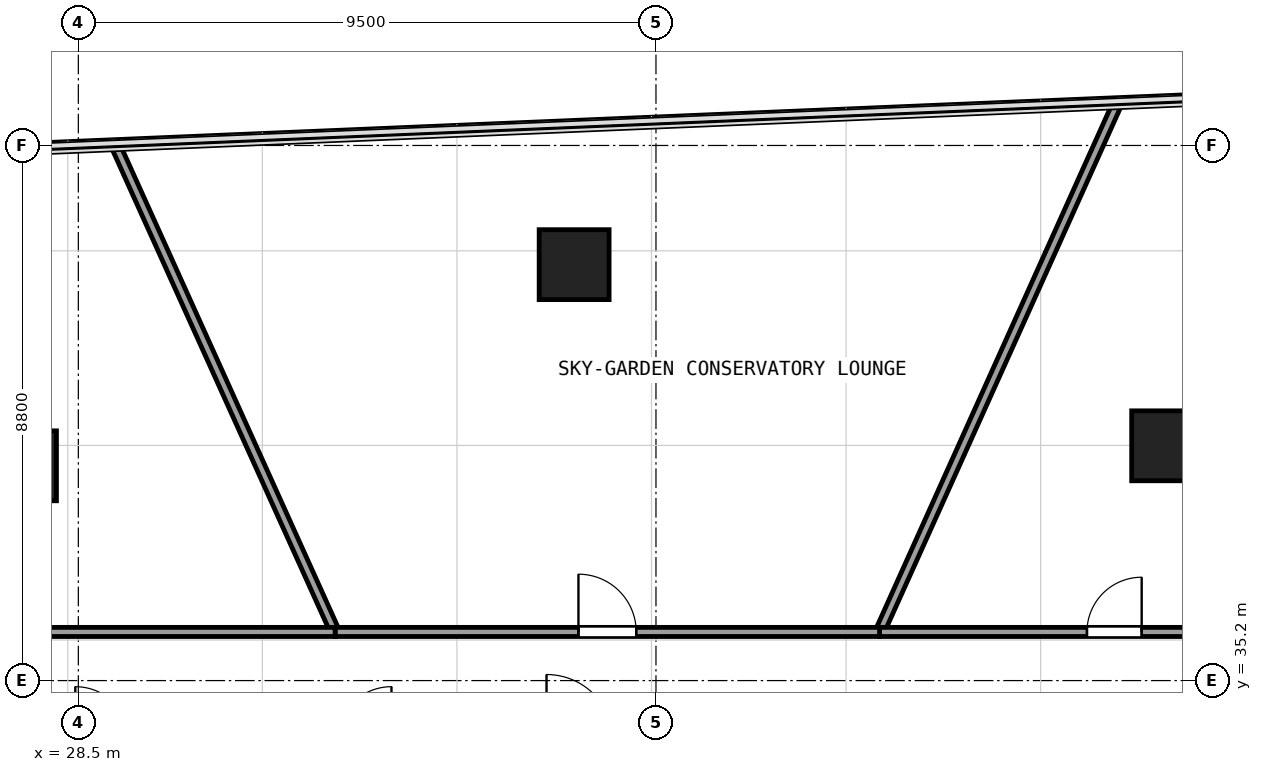
"""IFC4 building model, lengths in metres.
Left out: names, types, materials, properties, quantities, classifications, styles, units other than length and angle.
Written with IfcOpenShell. Run it as: python <this file> out.ifc"""

import sys

from ifc_helpers import new_model, si_unit, direction, frame, frame_2d, origin, origin_2d, place, context, subcontext, project, spatial, rectangle, extrude, element, fill, save


model = new_model("IFC4")
c1 = context("Model", 3, precision=1e-05, world=origin(), true_north=direction((0.0, 1.0)))
c2 = subcontext(c1, "Body", "Model", "MODEL_VIEW")
j1 = project(units=[si_unit("LENGTHUNIT", "METRE"), si_unit("PLANEANGLEUNIT", "RADIAN")], contexts=[c1])
p1 = place(None, origin())
s1 = spatial("IfcSite", under=j1, at=p1, CompositionType="ELEMENT")
p2 = place(p1, origin())
s2 = spatial("IfcBuilding", under=s1, at=p2, CompositionType="ELEMENT")
p3 = place(p2, frame((0.0, 0.0, 76.35)))
s3 = spatial("IfcBuildingStorey", under=s2, at=p3, CompositionType="ELEMENT", Elevation=76.35)
for number, where, z_axis, x_axis in (
    (1, (46.399, 39.061, -0.405), (0.0, 0.0, 1.0), (1.0, 0.0, 0.0)),
    (2, (36.654, 42.04, -0.405), (0.0, 0.0, 1.0), (1.0, 0.0, 0.0)),
    (3, (27.565, 38.732, -0.405), (0.0, 0.0, 1.0), (1.0, 0.0, 0.0)),
):
    element("IfcColumn", number, at=place(p3, frame(where, z_axis=z_axis, x_axis=x_axis)), inside=s3, PredefinedType="COLUMN", context=c2, shape_type="SweptSolid", body=[
        extrude(rectangle(XDim=1.15, YDim=1.15, at=origin_2d()), origin(), (0.0, 0.0, 1.0), 3.575),
    ])
p4 = place(p3, frame((45.608, 44.735, 0.0), z_axis=(0.0, 0.0, 1.0), x_axis=(-0.410374215248, -0.911917213052, 0.0)))
e4 = element("IfcWall", 4, at=p4, inside=s3, PredefinedType="PARTITIONING", context=c2, shape_type="SweptSolid", body=[
    extrude(rectangle(XDim=9.579, YDim=0.15, at=frame_2d((4.79, 0.0))), origin(), (0.0, 0.0, 1.0), 2.455),
])
p5 = place(p3, frame((41.677, 36.0, 0.0), z_axis=(0.0, 0.0, 1.0), x_axis=(1.0, 0.0, 0.0)))
e5 = element("IfcWall", 5, at=p5, inside=s3, PredefinedType="PARTITIONING", context=c2, shape_type="SweptSolid", body=[
    extrude(rectangle(XDim=7.723, YDim=0.15, at=frame_2d((3.861, 0.0))), origin(), (0.0, 0.0, 1.0), 2.455),
])
p6 = place(p5, frame((3.411, 0.0, 0.0)))
e6 = element("IfcOpeningElement", 6, at=p6, cuts=e5, PredefinedType="OPENING", context=c2, shape_type="SweptSolid", body=[
    extrude(rectangle(XDim=0.9, YDim=2.0, at=frame_2d((0.45, 1.0))), frame((0.0, 0.085, 0.0), z_axis=(0.0, -1.0, 0.0), x_axis=(1.0, 0.0, 0.0)), (0.0, 0.0, 1.0), 0.17),
])
p7 = place(p3, frame((29.093, 44.04, 0.0), z_axis=(0.0, 0.0, 1.0), x_axis=(0.41148290583, -0.911417477455, 0.0)))
e7 = element("IfcWall", 7, at=p7, inside=s3, PredefinedType="PARTITIONING", context=c2, shape_type="SweptSolid", body=[
    extrude(rectangle(XDim=8.822, YDim=0.15, at=frame_2d((4.411, 0.0))), origin(), (0.0, 0.0, 1.0), 2.455),
])
p8 = place(p3, frame((32.723, 36.0, 0.0), z_axis=(0.0, 0.0, 1.0), x_axis=(1.0, 0.0, 0.0)))
e8 = element("IfcWall", 8, at=p8, inside=s3, PredefinedType="PARTITIONING", context=c2, shape_type="SweptSolid", body=[
    extrude(rectangle(XDim=8.954, YDim=0.15, at=frame_2d((4.477, 0.0))), origin(), (0.0, 0.0, 1.0), 2.467),
])
p9 = place(p8, frame((4.002, 0.0, 0.0)))
e9 = element("IfcOpeningElement", 9, at=p9, cuts=e8, PredefinedType="OPENING", context=c2, shape_type="SweptSolid", body=[
    extrude(rectangle(XDim=0.95, YDim=2.15, at=frame_2d((0.475, 1.075))), frame((0.0, 0.085, 0.0), z_axis=(0.0, -1.0, 0.0), x_axis=(1.0, 0.0, 0.0)), (0.0, 0.0, 1.0), 0.17),
])
p10 = place(p3, frame((26.8, 36.0, 0.0), z_axis=(0.0, 0.0, 1.0), x_axis=(1.0, 0.0, 0.0)))
e10 = element("IfcWall", 10, at=p10, inside=s3, PredefinedType="PARTITIONING", context=c2, shape_type="SweptSolid", body=[
    extrude(rectangle(XDim=5.923, YDim=0.15, at=frame_2d((2.961, 0.0))), origin(), (0.0, 0.0, 1.0), 2.467),
])
p11 = place(p6, origin())
e11 = element("IfcDoor", 11, at=p11, inside=s3, OperationType="SINGLE_SWING_RIGHT", PredefinedType="DOOR", context=c2, shape_type="SweptSolid", body=[
    extrude(rectangle(XDim=0.9, YDim=2.0, at=frame_2d((0.45, 1.0))), frame((0.0, 0.025, 0.0), z_axis=(0.0, -1.0, 0.0), x_axis=(1.0, 0.0, 0.0)), (0.0, 0.0, 1.0), 0.05),
])
fill(e6, e11)
p12 = place(p9, origin())
e12 = element("IfcDoor", 12, at=p12, inside=s3, OperationType="SINGLE_SWING_LEFT", PredefinedType="DOOR", context=c2, shape_type="SweptSolid", body=[
    extrude(rectangle(XDim=0.95, YDim=2.15, at=frame_2d((0.475, 1.075))), frame((0.0, 0.025, 0.0), z_axis=(0.0, -1.0, 0.0), x_axis=(1.0, 0.0, 0.0)), (0.0, 0.0, 1.0), 0.05),
])
fill(e9, e12)
save(model, sys.argv[1])
